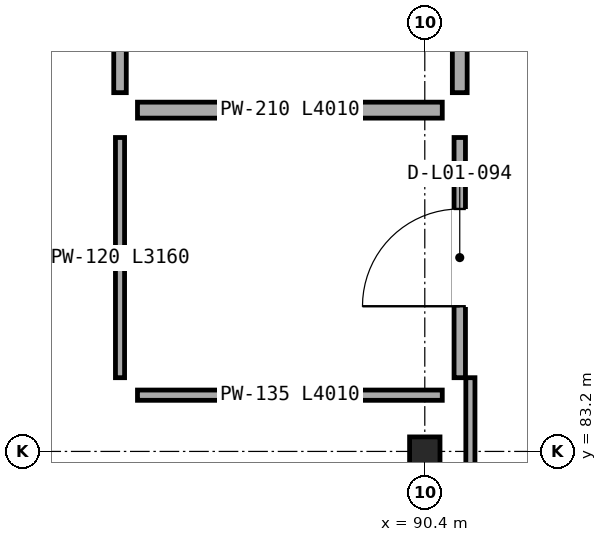
"""IFC4 building model, lengths in metres.
Left out: names, types, materials, properties, quantities, classifications, styles, units other than length and angle.
Written with IfcOpenShell. Run it as: python <this file> out.ifc"""

import sys

from ifc_helpers import new_model, si_unit, direction, frame, frame_2d, origin, origin_2d, place, context, subcontext, project, spatial, rectangle, i_section, extrude, element, fill, save


model = new_model("IFC4")
c1 = context("Model", 3, precision=1e-05, world=origin(), true_north=direction((0.0, 1.0)))
c2 = subcontext(c1, "Body", "Model", "MODEL_VIEW")
j1 = project(units=[si_unit("LENGTHUNIT", "METRE"), si_unit("PLANEANGLEUNIT", "RADIAN")], contexts=[c1])
p1 = place(None, origin())
s1 = spatial("IfcSite", under=j1, at=p1, CompositionType="ELEMENT")
p2 = place(p1, origin())
s2 = spatial("IfcBuilding", under=s1, at=p2, CompositionType="ELEMENT")
p3 = place(p2, frame((0.0, 0.0, 5.6)))
s3 = spatial("IfcBuildingStorey", under=s2, at=p3, CompositionType="ELEMENT", Elevation=5.6)
p4 = place(p3, frame((90.4, 83.2, 0.0), z_axis=(0.0, 0.0, 1.0), x_axis=(1.0, 0.0, 0.0)))
e1 = element("IfcColumn", 1, at=p4, inside=s3, PredefinedType="COLUMN", context=c2, shape_type="SweptSolid", body=[
    extrude(i_section(OverallWidth=0.4, OverallDepth=0.382, WebThickness=0.025, FlangeThickness=0.036, at=origin_2d()), origin(), (0.0, 0.0, 1.0), 4.5),
])
p5 = place(p3, frame((90.63, 87.69, 0.0), z_axis=(0.0, 0.0, 1.0), x_axis=(-1.0, 0.0, 0.0)))
e2 = element("IfcWall", 2, at=p5, inside=s3, PredefinedType="PARTITIONING", context=c2, shape_type="SweptSolid", body=[
    extrude(rectangle(XDim=4.01, YDim=0.21, at=frame_2d((2.005, 0.0))), origin(), (0.0, 0.0, 1.0), 3.763),
])
p6 = place(p3, frame((90.86, 91.08, 0.0), z_axis=(0.0, 0.0, 1.0), x_axis=(0.0, -1.0, 0.0)))
e3 = element("IfcWall", 3, at=p6, inside=s3, PredefinedType="PARTITIONING", context=c2, shape_type="SweptSolid", body=[
    extrude(rectangle(XDim=3.16, YDim=0.195, at=frame_2d((1.58, 0.0))), origin(), (0.0, 0.0, 1.0), 4.13),
])
p7 = place(p6, frame((1.03, 0.0, 0.0)))
e4 = element("IfcOpeningElement", 4, at=p7, cuts=e3, PredefinedType="OPENING", context=c2, shape_type="SweptSolid", body=[
    extrude(rectangle(XDim=1.1, YDim=2.24, at=frame_2d((0.55, 1.12))), frame((0.0, 0.107, 0.0), z_axis=(0.0, -1.0, 0.0), x_axis=(1.0, 0.0, 0.0)), (0.0, 0.0, 1.0), 0.215),
])
p8 = place(p3, frame((86.39, 87.92, 0.0), z_axis=(0.0, 0.0, 1.0), x_axis=(0.0, 1.0, 0.0)))
e5 = element("IfcWall", 5, at=p8, inside=s3, PredefinedType="PARTITIONING", context=c2, shape_type="SweptSolid", body=[
    extrude(rectangle(XDim=3.16, YDim=0.165, at=frame_2d((1.58, 0.0))), origin(), (0.0, 0.0, 1.0), 4.13),
])
p9 = place(p8, frame((0.99, 0.0, 0.0)))
e6 = element("IfcOpeningElement", 6, at=p9, cuts=e5, PredefinedType="OPENING", context=c2, shape_type="SweptSolid", body=[
    extrude(rectangle(XDim=1.18, YDim=2.24, at=frame_2d((0.59, 1.12))), frame((0.0, 0.093, 0.0), z_axis=(0.0, -1.0, 0.0), x_axis=(1.0, 0.0, 0.0)), (0.0, 0.0, 1.0), 0.185),
])
p10 = place(p3, frame((90.86, 87.33, 0.0), z_axis=(0.0, 0.0, 1.0), x_axis=(0.0, -1.0, 0.0)))
e7 = element("IfcWall", 7, at=p10, inside=s3, PredefinedType="PARTITIONING", context=c2, shape_type="SweptSolid", body=[
    extrude(rectangle(XDim=3.16, YDim=0.15, at=frame_2d((1.58, 0.0))), origin(), (0.0, 0.0, 1.0), 4.13),
])
p11 = place(p10, frame((0.94, 0.0, 0.0)))
e8 = element("IfcOpeningElement", 8, at=p11, cuts=e7, PredefinedType="OPENING", context=c2, shape_type="SweptSolid", body=[
    extrude(rectangle(XDim=1.28, YDim=2.24, at=frame_2d((0.64, 1.12))), frame((0.0, 0.085, 0.0), z_axis=(0.0, -1.0, 0.0), x_axis=(1.0, 0.0, 0.0)), (0.0, 0.0, 1.0), 0.17),
])
p12 = place(p3, frame((90.63, 83.94, 0.0), z_axis=(0.0, 0.0, 1.0), x_axis=(-1.0, 0.0, 0.0)))
e9 = element("IfcWall", 9, at=p12, inside=s3, PredefinedType="PARTITIONING", context=c2, shape_type="SweptSolid", body=[
    extrude(rectangle(XDim=4.01, YDim=0.135, at=frame_2d((2.005, 0.0))), origin(), (0.0, 0.0, 1.0), 3.763),
])
p13 = place(p3, frame((86.39, 84.17, 0.0), z_axis=(0.0, 0.0, 1.0), x_axis=(0.0, 1.0, 0.0)))
e10 = element("IfcWall", 10, at=p13, inside=s3, PredefinedType="PARTITIONING", context=c2, shape_type="SweptSolid", body=[
    extrude(rectangle(XDim=3.16, YDim=0.12, at=frame_2d((1.58, 0.0))), origin(), (0.0, 0.0, 1.0), 4.13),
])
p14 = place(p3, frame((91.0, 84.17, 0.0), z_axis=(0.0, 0.0, 1.0), x_axis=(0.0, -1.0, 0.0)))
e11 = element("IfcWall", 11, at=p14, inside=s3, PredefinedType="PARTITIONING", context=c2, shape_type="SweptSolid", body=[
    extrude(rectangle(XDim=4.29, YDim=0.12, at=frame_2d((2.145, 0.0))), origin(), (0.0, 0.0, 1.0), 3.613),
])
p15 = place(p11, frame((1.28, 0.0, 0.0), z_axis=(0.0, 0.0, 1.0), x_axis=(-1.0, 0.0, 0.0)))
e12 = element("IfcDoor", 12, at=p15, inside=s3, OperationType="SINGLE_SWING_RIGHT", PredefinedType="DOOR", context=c2, shape_type="SweptSolid", body=[
    extrude(rectangle(XDim=1.28, YDim=2.24, at=frame_2d((0.64, 1.12))), frame((0.0, 0.025, 0.0), z_axis=(0.0, -1.0, 0.0), x_axis=(1.0, 0.0, 0.0)), (0.0, 0.0, 1.0), 0.05),
])
fill(e8, e12)
save(model, sys.argv[1])
